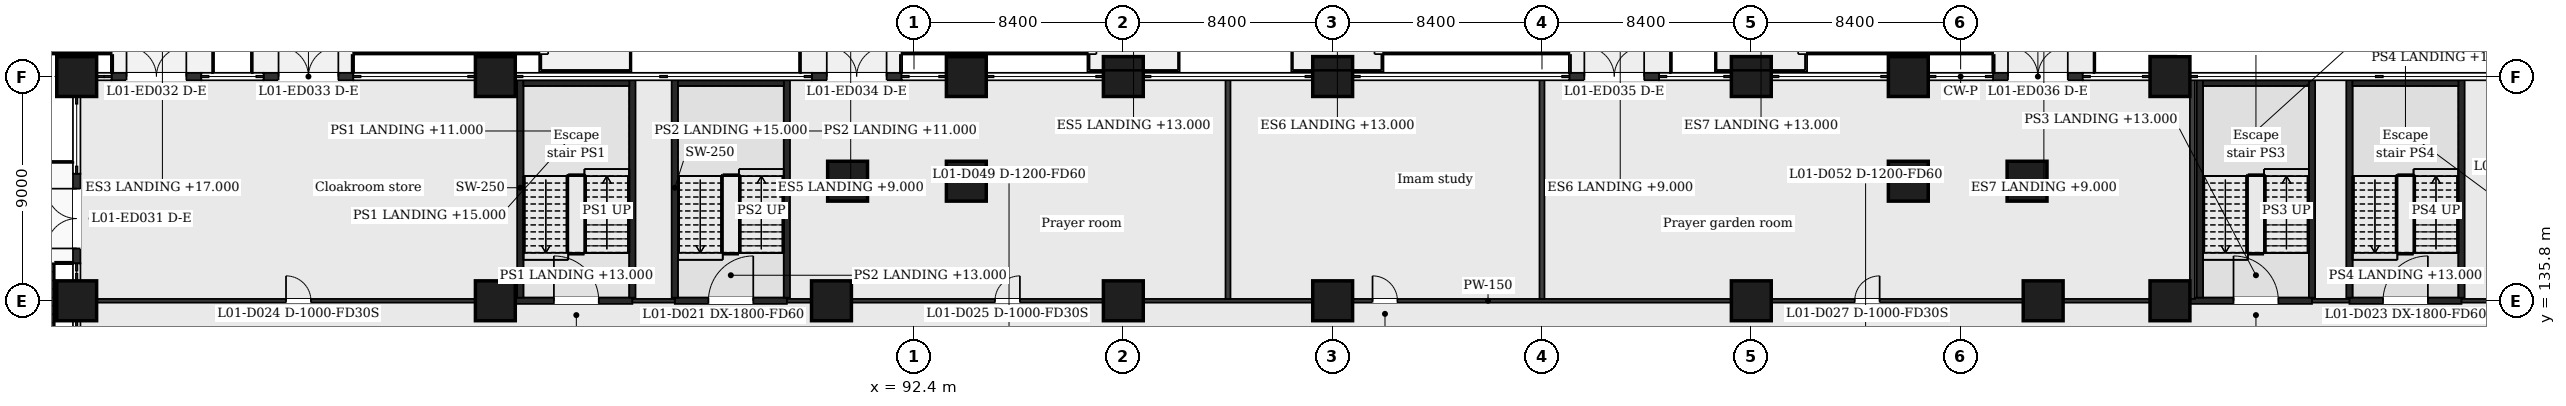
"""IFC4 building model, lengths in metres.
Left out: names, types, materials, properties, quantities, classifications, styles, units other than length and angle.
Written with IfcOpenShell. Run it as: python <this file> out.ifc"""

import sys

from ifc_helpers import new_model, si_unit, direction, frame, frame_2d, origin, origin_2d, place, context, subcontext, project, spatial, rectangle, extrude, element, fill, save


model = new_model("IFC4")
c1 = context("Model", 3, precision=1e-05, world=origin(), true_north=direction((0.0, 1.0)))
c2 = subcontext(c1, "Body", "Model", "MODEL_VIEW")
j1 = project(units=[si_unit("LENGTHUNIT", "METRE"), si_unit("PLANEANGLEUNIT", "RADIAN")], contexts=[c1])
p1 = place(None, origin())
s1 = spatial("IfcSite", under=j1, at=p1, CompositionType="ELEMENT")
p2 = place(p1, origin())
s2 = spatial("IfcBuilding", under=s1, at=p2, CompositionType="ELEMENT")
p3 = place(p2, frame((0.0, 0.0, 9.0)))
s3 = spatial("IfcBuildingStorey", under=s2, at=p3, CompositionType="ELEMENT", Elevation=9.0)
for number, where, z_axis, x_axis in (
    (1, (58.8, 135.8, 0.0), (0.0, 0.0, 1.0), (1.0, 0.0, 0.0)),
    (2, (75.6, 135.8, 0.0), (0.0, 0.0, 1.0), (1.0, 0.0, 0.0)),
    (3, (89.088, 135.8, 0.0), (0.0, 0.0, 1.0), (1.0, 0.0, 0.0)),
    (4, (100.8, 135.8, 0.0), (0.0, 0.0, 1.0), (1.0, 0.0, 0.0)),
    (5, (109.2, 135.8, 0.0), (0.0, 0.0, 1.0), (1.0, 0.0, 0.0)),
    (6, (126.0, 135.8, 0.0), (0.0, 0.0, 1.0), (1.0, 0.0, 0.0)),
    (7, (137.711, 135.8, 0.0), (0.0, 0.0, 1.0), (1.0, 0.0, 0.0)),
    (8, (142.8, 135.8, 0.0), (0.0, 0.0, 1.0), (1.0, 0.0, 0.0)),
    (9, (89.735, 140.6, 0.0), (0.0, 0.0, 1.0), (1.0, 0.0, 0.0)),
    (10, (94.5, 140.6, 0.0), (0.0, 0.0, 1.0), (1.0, 0.0, 0.0)),
    (11, (132.3, 140.6, 0.0), (0.0, 0.0, 1.0), (1.0, 0.0, 0.0)),
    (12, (137.065, 140.6, 0.0), (0.0, 0.0, 1.0), (1.0, 0.0, 0.0)),
    (13, (58.8, 144.8, 0.0), (0.0, 0.0, 1.0), (1.0, 0.0, 0.0)),
    (14, (75.6, 144.8, 0.0), (0.0, 0.0, 1.0), (1.0, 0.0, 0.0)),
    (15, (94.5, 144.8, 0.0), (0.0, 0.0, 1.0), (1.0, 0.0, 0.0)),
    (16, (100.8, 144.8, 0.0), (0.0, 0.0, 1.0), (1.0, 0.0, 0.0)),
    (17, (109.2, 144.8, 0.0), (0.0, 0.0, 1.0), (1.0, 0.0, 0.0)),
    (18, (126.0, 144.8, 0.0), (0.0, 0.0, 1.0), (1.0, 0.0, 0.0)),
    (19, (132.3, 144.8, 0.0), (0.0, 0.0, 1.0), (1.0, 0.0, 0.0)),
    (20, (142.8, 144.8, 0.0), (0.0, 0.0, 1.0), (1.0, 0.0, 0.0)),
):
    element("IfcColumn", number, at=place(p3, frame(where, z_axis=z_axis, x_axis=x_axis)), inside=s3, PredefinedType="COLUMN", context=c2, shape_type="SweptSolid", body=[
        extrude(rectangle(XDim=1.6, YDim=1.6, at=origin_2d()), origin(), (0.0, 0.0, 1.0), 8.0),
    ])
p4 = place(p3, frame((58.8, 137.3, 0.0), z_axis=(0.0, 0.0, 1.0), x_axis=(0.0, 1.0, 0.0)))
e21 = element("IfcWall", 21, at=p4, inside=s3, PredefinedType="SOLIDWALL", context=c2, shape_type="SweptSolid", body=[
    extrude(rectangle(XDim=3.6, YDim=0.3, at=frame_2d((1.8, 0.0))), origin(), (0.0, 0.0, 1.0), 7.1),
])
p5 = place(p4, frame((0.6, 0.0, 0.0)))
e22 = element("IfcOpeningElement", 22, at=p5, cuts=e21, PredefinedType="OPENING", context=c2, shape_type="SweptSolid", body=[
    extrude(rectangle(XDim=2.4, YDim=2.4, at=frame_2d((1.2, 1.2))), frame((0.0, 0.16, 0.0), z_axis=(0.0, -1.0, 0.0), x_axis=(1.0, 0.0, 0.0)), (0.0, 0.0, 1.0), 0.32),
])
p6 = place(p3, frame((60.2, 144.8, 0.0), z_axis=(0.0, 0.0, 1.0), x_axis=(1.0, 0.0, 0.0)))
e23 = element("IfcWall", 23, at=p6, inside=s3, PredefinedType="SOLIDWALL", context=c2, shape_type="SweptSolid", body=[
    extrude(rectangle(XDim=3.6, YDim=0.3, at=frame_2d((1.8, 0.0))), origin(), (0.0, 0.0, 1.0), 7.1),
])
p7 = place(p6, frame((0.6, 0.0, 0.0)))
e24 = element("IfcOpeningElement", 24, at=p7, cuts=e23, PredefinedType="OPENING", context=c2, shape_type="SweptSolid", body=[
    extrude(rectangle(XDim=2.4, YDim=2.4, at=frame_2d((1.2, 1.2))), frame((0.0, 0.16, 0.0), z_axis=(0.0, -1.0, 0.0), x_axis=(1.0, 0.0, 0.0)), (0.0, 0.0, 1.0), 0.32),
])
p8 = place(p3, frame((66.3, 144.8, 0.0), z_axis=(0.0, 0.0, 1.0), x_axis=(1.0, 0.0, 0.0)))
e25 = element("IfcWall", 25, at=p8, inside=s3, PredefinedType="SOLIDWALL", context=c2, shape_type="SweptSolid", body=[
    extrude(rectangle(XDim=3.6, YDim=0.3, at=frame_2d((1.8, 0.0))), origin(), (0.0, 0.0, 1.0), 7.1),
])
p9 = place(p8, frame((0.6, 0.0, 0.0)))
e26 = element("IfcOpeningElement", 26, at=p9, cuts=e25, PredefinedType="OPENING", context=c2, shape_type="SweptSolid", body=[
    extrude(rectangle(XDim=2.4, YDim=2.4, at=frame_2d((1.2, 1.2))), frame((0.0, 0.16, 0.0), z_axis=(0.0, -1.0, 0.0), x_axis=(1.0, 0.0, 0.0)), (0.0, 0.0, 1.0), 0.32),
])
p10 = place(p3, frame((88.3, 144.8, 0.0), z_axis=(0.0, 0.0, 1.0), x_axis=(1.0, 0.0, 0.0)))
e27 = element("IfcWall", 27, at=p10, inside=s3, PredefinedType="SOLIDWALL", context=c2, shape_type="SweptSolid", body=[
    extrude(rectangle(XDim=3.6, YDim=0.3, at=frame_2d((1.8, 0.0))), origin(), (0.0, 0.0, 1.0), 7.1),
])
p11 = place(p10, frame((0.6, 0.0, 0.0)))
e28 = element("IfcOpeningElement", 28, at=p11, cuts=e27, PredefinedType="OPENING", context=c2, shape_type="SweptSolid", body=[
    extrude(rectangle(XDim=2.4, YDim=2.4, at=frame_2d((1.2, 1.2))), frame((0.0, 0.16, 0.0), z_axis=(0.0, -1.0, 0.0), x_axis=(1.0, 0.0, 0.0)), (0.0, 0.0, 1.0), 0.32),
])
p12 = place(p3, frame((118.7, 144.8, 0.0), z_axis=(0.0, 0.0, 1.0), x_axis=(1.0, 0.0, 0.0)))
e29 = element("IfcWall", 29, at=p12, inside=s3, PredefinedType="SOLIDWALL", context=c2, shape_type="SweptSolid", body=[
    extrude(rectangle(XDim=3.6, YDim=0.3, at=frame_2d((1.8, 0.0))), origin(), (0.0, 0.0, 1.0), 7.1),
])
p13 = place(p12, frame((0.6, 0.0, 0.0)))
e30 = element("IfcOpeningElement", 30, at=p13, cuts=e29, PredefinedType="OPENING", context=c2, shape_type="SweptSolid", body=[
    extrude(rectangle(XDim=2.4, YDim=2.4, at=frame_2d((1.2, 1.2))), frame((0.0, 0.16, 0.0), z_axis=(0.0, -1.0, 0.0), x_axis=(1.0, 0.0, 0.0)), (0.0, 0.0, 1.0), 0.32),
])
p14 = place(p3, frame((135.7, 144.8, 0.0), z_axis=(0.0, 0.0, 1.0), x_axis=(1.0, 0.0, 0.0)))
e31 = element("IfcWall", 31, at=p14, inside=s3, PredefinedType="SOLIDWALL", context=c2, shape_type="SweptSolid", body=[
    extrude(rectangle(XDim=3.6, YDim=0.3, at=frame_2d((1.8, 0.0))), origin(), (0.0, 0.0, 1.0), 7.1),
])
p15 = place(p14, frame((0.6, 0.0, 0.0)))
e32 = element("IfcOpeningElement", 32, at=p15, cuts=e31, PredefinedType="OPENING", context=c2, shape_type="SweptSolid", body=[
    extrude(rectangle(XDim=2.4, YDim=2.4, at=frame_2d((1.2, 1.2))), frame((0.0, 0.16, 0.0), z_axis=(0.0, -1.0, 0.0), x_axis=(1.0, 0.0, 0.0)), (0.0, 0.0, 1.0), 0.32),
])
p16 = place(p3, frame((76.37, 135.8, 0.0), z_axis=(0.0, 0.0, 1.0), x_axis=(1.0, 0.0, 0.0)))
e33 = element("IfcWall", 33, at=p16, inside=s3, PredefinedType="PARTITIONING", context=c2, shape_type="SweptSolid", body=[
    extrude(rectangle(XDim=4.73, YDim=0.25, at=frame_2d((2.365, 0.0))), origin(), (0.0, 0.0, 1.0), 7.5),
])
p17 = place(p16, frame((1.58, 0.0, 0.0)))
e34 = element("IfcOpeningElement", 34, at=p17, cuts=e33, PredefinedType="OPENING", context=c2, shape_type="SweptSolid", body=[
    extrude(rectangle(XDim=1.8, YDim=2.1, at=frame_2d((0.9, 1.05))), frame((0.0, 0.135, 0.0), z_axis=(0.0, -1.0, 0.0), x_axis=(1.0, 0.0, 0.0)), (0.0, 0.0, 1.0), 0.27),
])
p18 = place(p3, frame((82.8, 135.8, 0.0), z_axis=(0.0, 0.0, 1.0), x_axis=(1.0, 0.0, 0.0)))
e35 = element("IfcWall", 35, at=p18, inside=s3, PredefinedType="PARTITIONING", context=c2, shape_type="SweptSolid", body=[
    extrude(rectangle(XDim=4.5, YDim=0.25, at=frame_2d((2.25, 0.0))), origin(), (0.0, 0.0, 1.0), 7.5),
])
p19 = place(p18, frame((1.35, 0.0, 0.0)))
e36 = element("IfcOpeningElement", 36, at=p19, cuts=e35, PredefinedType="OPENING", context=c2, shape_type="SweptSolid", body=[
    extrude(rectangle(XDim=1.8, YDim=2.1, at=frame_2d((0.9, 1.05))), frame((0.0, 0.135, 0.0), z_axis=(0.0, -1.0, 0.0), x_axis=(1.0, 0.0, 0.0)), (0.0, 0.0, 1.0), 0.27),
])
p20 = place(p3, frame((143.57, 135.8, 0.0), z_axis=(0.0, 0.0, 1.0), x_axis=(1.0, 0.0, 0.0)))
e37 = element("IfcWall", 37, at=p20, inside=s3, PredefinedType="PARTITIONING", context=c2, shape_type="SweptSolid", body=[
    extrude(rectangle(XDim=4.93, YDim=0.25, at=frame_2d((2.465, 0.0))), origin(), (0.0, 0.0, 1.0), 7.5),
])
p21 = place(p20, frame((1.78, 0.0, 0.0)))
e38 = element("IfcOpeningElement", 38, at=p21, cuts=e37, PredefinedType="OPENING", context=c2, shape_type="SweptSolid", body=[
    extrude(rectangle(XDim=1.8, YDim=2.1, at=frame_2d((0.9, 1.05))), frame((0.0, 0.135, 0.0), z_axis=(0.0, -1.0, 0.0), x_axis=(1.0, 0.0, 0.0)), (0.0, 0.0, 1.0), 0.27),
])
p22 = place(p3, frame((150.0, 135.8, 0.0), z_axis=(0.0, 0.0, 1.0), x_axis=(1.0, 0.0, 0.0)))
e39 = element("IfcWall", 39, at=p22, inside=s3, PredefinedType="PARTITIONING", context=c2, shape_type="SweptSolid", body=[
    extrude(rectangle(XDim=4.5, YDim=0.25, at=frame_2d((2.25, 0.0))), origin(), (0.0, 0.0, 1.0), 7.5),
])
p23 = place(p22, frame((1.35, 0.0, 0.0)))
e40 = element("IfcOpeningElement", 40, at=p23, cuts=e39, PredefinedType="OPENING", context=c2, shape_type="SweptSolid", body=[
    extrude(rectangle(XDim=1.8, YDim=2.1, at=frame_2d((0.9, 1.05))), frame((0.0, 0.135, 0.0), z_axis=(0.0, -1.0, 0.0), x_axis=(1.0, 0.0, 0.0)), (0.0, 0.0, 1.0), 0.27),
])
p24 = place(p3, frame((58.85, 135.8, 0.0), z_axis=(0.0, 0.0, 1.0), x_axis=(1.0, 0.0, 0.0)))
e41 = element("IfcWall", 41, at=p24, inside=s3, PredefinedType="PARTITIONING", context=c2, shape_type="SweptSolid", body=[
    extrude(rectangle(XDim=17.52, YDim=0.15, at=frame_2d((8.76, 0.0))), origin(), (0.0, 0.0, 1.0), 7.5),
])
p25 = place(p24, frame((8.35, 0.0, 0.0)))
e42 = element("IfcOpeningElement", 42, at=p25, cuts=e41, PredefinedType="OPENING", context=c2, shape_type="SweptSolid", body=[
    extrude(rectangle(XDim=1.0, YDim=2.1, at=frame_2d((0.5, 1.05))), frame((0.0, 0.085, 0.0), z_axis=(0.0, -1.0, 0.0), x_axis=(1.0, 0.0, 0.0)), (0.0, 0.0, 1.0), 0.17),
])
p26 = place(p3, frame((81.1, 135.8, 0.0), z_axis=(0.0, 0.0, 1.0), x_axis=(1.0, 0.0, 0.0)))
e43 = element("IfcWall", 43, at=p26, inside=s3, PredefinedType="PARTITIONING", context=c2, shape_type="SweptSolid", body=[
    extrude(rectangle(XDim=1.7, YDim=0.15, at=frame_2d((0.85, 0.0))), origin(), (0.0, 0.0, 1.0), 7.5),
])
p27 = place(p3, frame((87.3, 135.8, 0.0), z_axis=(0.0, 0.0, 1.0), x_axis=(1.0, 0.0, 0.0)))
e44 = element("IfcWall", 44, at=p27, inside=s3, PredefinedType="PARTITIONING", context=c2, shape_type="SweptSolid", body=[
    extrude(rectangle(XDim=56.27, YDim=0.15, at=frame_2d((28.135, 0.0))), origin(), (0.0, 0.0, 1.0), 7.5),
])
p28 = place(p27, frame((8.35, 0.0, 0.0)))
e45 = element("IfcOpeningElement", 45, at=p28, cuts=e44, PredefinedType="OPENING", context=c2, shape_type="SweptSolid", body=[
    extrude(rectangle(XDim=1.0, YDim=2.1, at=frame_2d((0.5, 1.05))), frame((0.0, 0.085, 0.0), z_axis=(0.0, -1.0, 0.0), x_axis=(1.0, 0.0, 0.0)), (0.0, 0.0, 1.0), 0.17),
])
p29 = place(p27, frame((23.5, 0.0, 0.0)))
e46 = element("IfcOpeningElement", 46, at=p29, cuts=e44, PredefinedType="OPENING", context=c2, shape_type="SweptSolid", body=[
    extrude(rectangle(XDim=1.0, YDim=2.1, at=frame_2d((0.5, 1.05))), frame((0.0, 0.085, 0.0), z_axis=(0.0, -1.0, 0.0), x_axis=(1.0, 0.0, 0.0)), (0.0, 0.0, 1.0), 0.17),
])
p30 = place(p27, frame((42.85, 0.0, 0.0)))
e47 = element("IfcOpeningElement", 47, at=p30, cuts=e44, PredefinedType="OPENING", context=c2, shape_type="SweptSolid", body=[
    extrude(rectangle(XDim=1.0, YDim=2.1, at=frame_2d((0.5, 1.05))), frame((0.0, 0.085, 0.0), z_axis=(0.0, -1.0, 0.0), x_axis=(1.0, 0.0, 0.0)), (0.0, 0.0, 1.0), 0.17),
])
p31 = place(p3, frame((148.5, 135.8, 0.0), z_axis=(0.0, 0.0, 1.0), x_axis=(1.0, 0.0, 0.0)))
e48 = element("IfcWall", 48, at=p31, inside=s3, PredefinedType="PARTITIONING", context=c2, shape_type="SweptSolid", body=[
    extrude(rectangle(XDim=1.5, YDim=0.15, at=frame_2d((0.75, 0.0))), origin(), (0.0, 0.0, 1.0), 7.5),
])
p32 = place(p3, frame((154.5, 135.8, 0.0), z_axis=(0.0, 0.0, 1.0), x_axis=(1.0, 0.0, 0.0)))
e49 = element("IfcWall", 49, at=p32, inside=s3, PredefinedType="PARTITIONING", context=c2, shape_type="SweptSolid", body=[
    extrude(rectangle(XDim=5.05, YDim=0.15, at=frame_2d((2.525, 0.0))), origin(), (0.0, 0.0, 1.0), 7.5),
])
for number, where, z_axis, x_axis in (
    (50, (76.6, 135.925, 0.0), (0.0, 0.0, 1.0), (0.0, 1.0, 0.0)),
    (51, (81.1, 135.925, 0.0), (0.0, 0.0, 1.0), (0.0, 1.0, 0.0)),
    (52, (82.8, 135.925, 0.0), (0.0, 0.0, 1.0), (0.0, 1.0, 0.0)),
    (53, (87.3, 135.925, 0.0), (0.0, 0.0, 1.0), (0.0, 1.0, 0.0)),
):
    element("IfcWall", number, at=place(p3, frame(where, z_axis=z_axis, x_axis=x_axis)), inside=s3, PredefinedType="PARTITIONING", context=c2, shape_type="SweptSolid", body=[
        extrude(rectangle(XDim=8.825, YDim=0.25, at=frame_2d((4.413, 0.0))), origin(), (0.0, 0.0, 1.0), 7.5),
    ])
for number, where, z_axis, x_axis in (
    (54, (105.0, 135.875, 0.0), (0.0, 0.0, 1.0), (0.0, 1.0, 0.0)),
    (55, (117.6, 135.875, 0.0), (0.0, 0.0, 1.0), (0.0, 1.0, 0.0)),
    (56, (143.7, 135.875, 0.0), (0.0, 0.0, 1.0), (0.0, 1.0, 0.0)),
):
    element("IfcWall", number, at=place(p3, frame(where, z_axis=z_axis, x_axis=x_axis)), inside=s3, PredefinedType="PARTITIONING", context=c2, shape_type="SweptSolid", body=[
        extrude(rectangle(XDim=8.875, YDim=0.2, at=frame_2d((4.438, 0.0))), origin(), (0.0, 0.0, 1.0), 7.5),
    ])
for number, where, z_axis, x_axis in (
    (57, (144.0, 135.925, 0.0), (0.0, 0.0, 1.0), (0.0, 1.0, 0.0)),
    (58, (148.5, 135.925, 0.0), (0.0, 0.0, 1.0), (0.0, 1.0, 0.0)),
    (59, (150.0, 135.925, 0.0), (0.0, 0.0, 1.0), (0.0, 1.0, 0.0)),
    (60, (154.5, 135.925, 0.0), (0.0, 0.0, 1.0), (0.0, 1.0, 0.0)),
):
    element("IfcWall", number, at=place(p3, frame(where, z_axis=z_axis, x_axis=x_axis)), inside=s3, PredefinedType="PARTITIONING", context=c2, shape_type="SweptSolid", body=[
        extrude(rectangle(XDim=8.825, YDim=0.25, at=frame_2d((4.413, 0.0))), origin(), (0.0, 0.0, 1.0), 7.5),
    ])
for number, where, z_axis, x_axis in (
    (61, (76.725, 144.538, 0.0), (0.0, 0.0, 1.0), (1.0, 0.0, 0.0)),
    (62, (82.925, 144.538, 0.0), (0.0, 0.0, 1.0), (1.0, 0.0, 0.0)),
    (63, (144.125, 144.538, 0.0), (0.0, 0.0, 1.0), (1.0, 0.0, 0.0)),
    (64, (150.125, 144.538, 0.0), (0.0, 0.0, 1.0), (1.0, 0.0, 0.0)),
):
    element("IfcWall", number, at=place(p3, frame(where, z_axis=z_axis, x_axis=x_axis)), inside=s3, PredefinedType="PARTITIONING", context=c2, shape_type="SweptSolid", body=[
        extrude(rectangle(XDim=4.25, YDim=0.225, at=frame_2d((2.125, 0.0))), origin(), (0.0, 0.0, 1.0), 7.5),
    ])
p33 = place(p5, origin())
e65 = element("IfcDoor", 65, at=p33, inside=s3, OperationType="DOUBLE_DOOR_DOUBLE_SWING", PredefinedType="DOOR", context=c2, shape_type="SweptSolid", body=[
    extrude(rectangle(XDim=2.4, YDim=2.4, at=frame_2d((1.2, 1.2))), frame((0.0, 0.025, 0.0), z_axis=(0.0, -1.0, 0.0), x_axis=(1.0, 0.0, 0.0)), (0.0, 0.0, 1.0), 0.05),
])
fill(e22, e65)
p34 = place(p7, origin())
e66 = element("IfcDoor", 66, at=p34, inside=s3, OperationType="DOUBLE_DOOR_DOUBLE_SWING", PredefinedType="DOOR", context=c2, shape_type="SweptSolid", body=[
    extrude(rectangle(XDim=2.4, YDim=2.4, at=frame_2d((1.2, 1.2))), frame((0.0, 0.025, 0.0), z_axis=(0.0, -1.0, 0.0), x_axis=(1.0, 0.0, 0.0)), (0.0, 0.0, 1.0), 0.05),
])
fill(e24, e66)
p35 = place(p9, origin())
e67 = element("IfcDoor", 67, at=p35, inside=s3, OperationType="DOUBLE_DOOR_DOUBLE_SWING", PredefinedType="DOOR", context=c2, shape_type="SweptSolid", body=[
    extrude(rectangle(XDim=2.4, YDim=2.4, at=frame_2d((1.2, 1.2))), frame((0.0, 0.025, 0.0), z_axis=(0.0, -1.0, 0.0), x_axis=(1.0, 0.0, 0.0)), (0.0, 0.0, 1.0), 0.05),
])
fill(e26, e67)
p36 = place(p11, origin())
e68 = element("IfcDoor", 68, at=p36, inside=s3, OperationType="DOUBLE_DOOR_DOUBLE_SWING", PredefinedType="DOOR", context=c2, shape_type="SweptSolid", body=[
    extrude(rectangle(XDim=2.4, YDim=2.4, at=frame_2d((1.2, 1.2))), frame((0.0, 0.025, 0.0), z_axis=(0.0, -1.0, 0.0), x_axis=(1.0, 0.0, 0.0)), (0.0, 0.0, 1.0), 0.05),
])
fill(e28, e68)
p37 = place(p13, origin())
e69 = element("IfcDoor", 69, at=p37, inside=s3, OperationType="DOUBLE_DOOR_DOUBLE_SWING", PredefinedType="DOOR", context=c2, shape_type="SweptSolid", body=[
    extrude(rectangle(XDim=2.4, YDim=2.4, at=frame_2d((1.2, 1.2))), frame((0.0, 0.025, 0.0), z_axis=(0.0, -1.0, 0.0), x_axis=(1.0, 0.0, 0.0)), (0.0, 0.0, 1.0), 0.05),
])
fill(e30, e69)
p38 = place(p15, origin())
e70 = element("IfcDoor", 70, at=p38, inside=s3, OperationType="DOUBLE_DOOR_DOUBLE_SWING", PredefinedType="DOOR", context=c2, shape_type="SweptSolid", body=[
    extrude(rectangle(XDim=2.4, YDim=2.4, at=frame_2d((1.2, 1.2))), frame((0.0, 0.025, 0.0), z_axis=(0.0, -1.0, 0.0), x_axis=(1.0, 0.0, 0.0)), (0.0, 0.0, 1.0), 0.05),
])
fill(e32, e70)
p39 = place(p17, origin())
e71 = element("IfcDoor", 71, at=p39, inside=s3, OperationType="SINGLE_SWING_LEFT", PredefinedType="DOOR", context=c2, shape_type="SweptSolid", body=[
    extrude(rectangle(XDim=1.8, YDim=2.1, at=frame_2d((0.9, 1.05))), frame((0.0, 0.025, 0.0), z_axis=(0.0, -1.0, 0.0), x_axis=(1.0, 0.0, 0.0)), (0.0, 0.0, 1.0), 0.05),
])
fill(e34, e71)
p40 = place(p19, origin())
e72 = element("IfcDoor", 72, at=p40, inside=s3, OperationType="SINGLE_SWING_RIGHT", PredefinedType="DOOR", context=c2, shape_type="SweptSolid", body=[
    extrude(rectangle(XDim=1.8, YDim=2.1, at=frame_2d((0.9, 1.05))), frame((0.0, 0.025, 0.0), z_axis=(0.0, -1.0, 0.0), x_axis=(1.0, 0.0, 0.0)), (0.0, 0.0, 1.0), 0.05),
])
fill(e36, e72)
p41 = place(p21, origin())
e73 = element("IfcDoor", 73, at=p41, inside=s3, OperationType="SINGLE_SWING_LEFT", PredefinedType="DOOR", context=c2, shape_type="SweptSolid", body=[
    extrude(rectangle(XDim=1.8, YDim=2.1, at=frame_2d((0.9, 1.05))), frame((0.0, 0.025, 0.0), z_axis=(0.0, -1.0, 0.0), x_axis=(1.0, 0.0, 0.0)), (0.0, 0.0, 1.0), 0.05),
])
fill(e38, e73)
p42 = place(p23, origin())
e74 = element("IfcDoor", 74, at=p42, inside=s3, OperationType="SINGLE_SWING_RIGHT", PredefinedType="DOOR", context=c2, shape_type="SweptSolid", body=[
    extrude(rectangle(XDim=1.8, YDim=2.1, at=frame_2d((0.9, 1.05))), frame((0.0, 0.025, 0.0), z_axis=(0.0, -1.0, 0.0), x_axis=(1.0, 0.0, 0.0)), (0.0, 0.0, 1.0), 0.05),
])
fill(e40, e74)
p43 = place(p25, origin())
e75 = element("IfcDoor", 75, at=p43, inside=s3, OperationType="SINGLE_SWING_LEFT", PredefinedType="DOOR", context=c2, shape_type="SweptSolid", body=[
    extrude(rectangle(XDim=1.0, YDim=2.1, at=frame_2d((0.5, 1.05))), frame((0.0, 0.025, 0.0), z_axis=(0.0, -1.0, 0.0), x_axis=(1.0, 0.0, 0.0)), (0.0, 0.0, 1.0), 0.05),
])
fill(e42, e75)
p44 = place(p28, origin())
e76 = element("IfcDoor", 76, at=p44, inside=s3, OperationType="SINGLE_SWING_RIGHT", PredefinedType="DOOR", context=c2, shape_type="SweptSolid", body=[
    extrude(rectangle(XDim=1.0, YDim=2.1, at=frame_2d((0.5, 1.05))), frame((0.0, 0.025, 0.0), z_axis=(0.0, -1.0, 0.0), x_axis=(1.0, 0.0, 0.0)), (0.0, 0.0, 1.0), 0.05),
])
fill(e45, e76)
p45 = place(p29, origin())
e77 = element("IfcDoor", 77, at=p45, inside=s3, OperationType="SINGLE_SWING_LEFT", PredefinedType="DOOR", context=c2, shape_type="SweptSolid", body=[
    extrude(rectangle(XDim=1.0, YDim=2.1, at=frame_2d((0.5, 1.05))), frame((0.0, 0.025, 0.0), z_axis=(0.0, -1.0, 0.0), x_axis=(1.0, 0.0, 0.0)), (0.0, 0.0, 1.0), 0.05),
])
fill(e46, e77)
p46 = place(p30, origin())
e78 = element("IfcDoor", 78, at=p46, inside=s3, OperationType="SINGLE_SWING_RIGHT", PredefinedType="DOOR", context=c2, shape_type="SweptSolid", body=[
    extrude(rectangle(XDim=1.0, YDim=2.1, at=frame_2d((0.5, 1.05))), frame((0.0, 0.025, 0.0), z_axis=(0.0, -1.0, 0.0), x_axis=(1.0, 0.0, 0.0)), (0.0, 0.0, 1.0), 0.05),
])
fill(e47, e78)
save(model, sys.argv[1])
